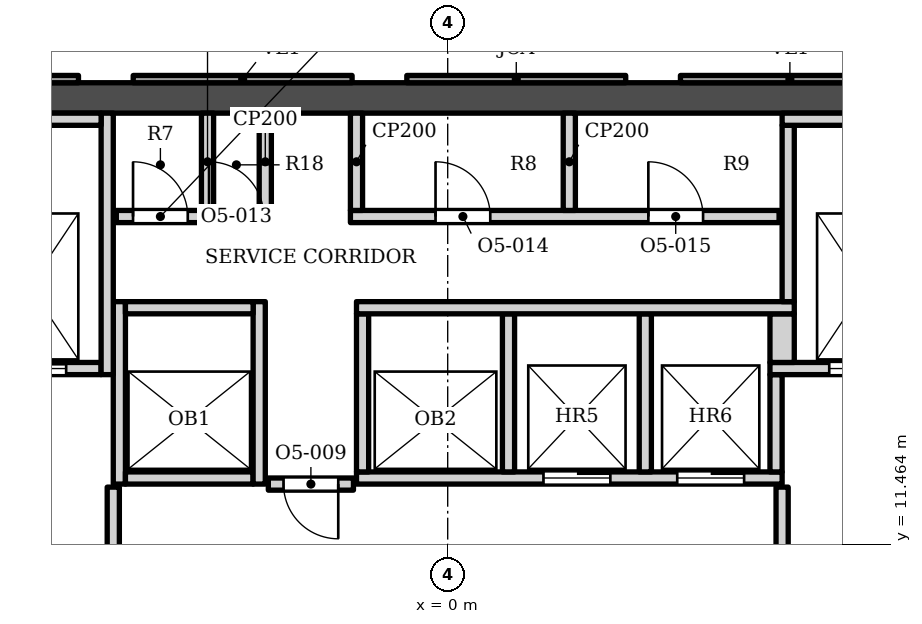
"""IFC4 building model, lengths in metres.
Left out: names, types, materials, properties, quantities, classifications, styles, units other than length and angle.
Written with IfcOpenShell. Run it as: python <this file> out.ifc"""

import sys

from ifc_helpers import new_model, si_unit, direction, frame, frame_2d, origin, place, context, subcontext, project, spatial, polyline, rectangle, outline, extrude, element, fill, save


model = new_model("IFC4")
c1 = context("Model", 3, precision=1e-05, world=origin(), true_north=direction((0.0, 1.0)))
c2 = subcontext(c1, "Body", "Model", "MODEL_VIEW")
j1 = project(units=[si_unit("LENGTHUNIT", "METRE"), si_unit("PLANEANGLEUNIT", "RADIAN")], contexts=[c1])
p1 = place(None, origin())
s1 = spatial("IfcSite", under=j1, at=p1, CompositionType="ELEMENT")
p2 = place(p1, origin())
s2 = spatial("IfcBuilding", under=s1, at=p2, CompositionType="ELEMENT")
p3 = place(p2, frame((0.0, 0.0, 196.4)))
s3 = spatial("IfcBuildingStorey", under=s2, at=p3, CompositionType="ELEMENT", Elevation=196.4)
p4 = place(p3, frame((-13.9, 18.802, 0.0), z_axis=(0.0, 0.0, 1.0), x_axis=(1.0, 0.0, 0.0)))
e1 = element("IfcWall", 1, at=p4, inside=s3, PredefinedType="SHEAR", context=c2, shape_type="SweptSolid", body=[
    extrude(rectangle(XDim=27.8, YDim=0.5, at=frame_2d((13.9, 0.0))), origin(), (0.0, 0.0, 1.0), 3.9),
])
p5 = place(p3, origin())
e2 = element("IfcWall", 2, at=p5, inside=s3, PredefinedType="ELEMENTEDWALL", context=c2, shape_type="SweptSolid", body=[
    extrude(outline(polyline([(3.828, 19.173), (3.828, 19.052), (7.428, 19.052), (7.428, 19.173), (3.828, 19.173)])), origin(), (0.0, 0.0, 1.0), 3.0),
])
p6 = place(p3, origin())
e3 = element("IfcWall", 3, at=p6, inside=s3, PredefinedType="SOLIDWALL", context=c2, shape_type="SweptSolid", body=[
    extrude(outline(polyline([(-0.672, 19.173), (-0.672, 19.052), (2.928, 19.052), (2.928, 19.173), (-0.672, 19.173)])), origin(), (0.0, 0.0, 1.0), 3.0),
])
p7 = place(p3, origin())
e4 = element("IfcWall", 4, at=p7, inside=s3, PredefinedType="ELEMENTEDWALL", context=c2, shape_type="SweptSolid", body=[
    extrude(outline(polyline([(-5.172, 19.173), (-5.172, 19.052), (-1.572, 19.052), (-1.572, 19.173), (-5.172, 19.173)])), origin(), (0.0, 0.0, 1.0), 3.0),
])
p8 = place(p3, origin())
e5 = element("IfcWall", 5, at=p8, inside=s3, PredefinedType="SOLIDWALL", context=c2, shape_type="SweptSolid", body=[
    extrude(outline(polyline([(-9.672, 19.173), (-9.672, 19.052), (-6.072, 19.052), (-6.072, 19.173), (-9.672, 19.173)])), origin(), (0.0, 0.0, 1.0), 3.0),
])
p9 = place(p3, frame((-5.5, 9.103, 0.0), z_axis=(0.0, 0.0, 1.0), x_axis=(0.0, 1.0, 0.0)))
e6 = element("IfcWall", 6, at=p9, inside=s3, PredefinedType="SOLIDWALL", context=c2, shape_type="SweptSolid", body=[
    extrude(rectangle(XDim=3.3, YDim=0.2, at=frame_2d((1.65, 0.0))), origin(), (0.0, 0.0, 1.0), 3.73),
])
p10 = place(p9, frame((0.85, 0.0, 0.0)))
e7 = element("IfcOpeningElement", 7, at=p10, cuts=e6, PredefinedType="OPENING", context=c2, shape_type="SweptSolid", body=[
    extrude(rectangle(XDim=1.4, YDim=2.1, at=frame_2d((0.7, 1.05))), frame((0.0, 0.11, 0.0), z_axis=(0.0, -1.0, 0.0), x_axis=(1.0, 0.0, 0.0)), (0.0, 0.0, 1.0), 0.22),
])
p11 = place(p3, frame((5.5, 9.103, 0.0), z_axis=(0.0, 0.0, 1.0), x_axis=(0.0, 1.0, 0.0)))
e8 = element("IfcWall", 8, at=p11, inside=s3, PredefinedType="SOLIDWALL", context=c2, shape_type="SweptSolid", body=[
    extrude(rectangle(XDim=3.3, YDim=0.2, at=frame_2d((1.65, 0.0))), origin(), (0.0, 0.0, 1.0), 3.73),
])
p12 = place(p11, frame((0.85, 0.0, 0.0)))
e9 = element("IfcOpeningElement", 9, at=p12, cuts=e8, PredefinedType="OPENING", context=c2, shape_type="SweptSolid", body=[
    extrude(rectangle(XDim=1.4, YDim=2.1, at=frame_2d((0.7, 1.05))), frame((0.0, 0.11, 0.0), z_axis=(0.0, -1.0, 0.0), x_axis=(1.0, 0.0, 0.0)), (0.0, 0.0, 1.0), 0.22),
])
p13 = place(p3, frame((-2.95, 12.453, 0.0), z_axis=(0.0, 0.0, 1.0), x_axis=(1.0, 0.0, 0.0)))
e10 = element("IfcWall", 10, at=p13, inside=s3, PredefinedType="SOLIDWALL", context=c2, shape_type="SweptSolid", body=[
    extrude(rectangle(XDim=1.4, YDim=0.2, at=frame_2d((0.7, 0.0))), origin(), (0.0, 0.0, 1.0), 3.73),
])
p14 = place(p13, frame((0.25, 0.0, 0.0)))
e11 = element("IfcOpeningElement", 11, at=p14, cuts=e10, PredefinedType="OPENING", context=c2, shape_type="SweptSolid", body=[
    extrude(rectangle(XDim=0.9, YDim=2.1, at=frame_2d((0.45, 1.05))), frame((0.0, 0.11, 0.0), z_axis=(0.0, -1.0, 0.0), x_axis=(1.0, 0.0, 0.0)), (0.0, 0.0, 1.0), 0.22),
])
p15 = place(p3, frame((-5.4, 12.453, 0.0), z_axis=(0.0, 0.0, 1.0), x_axis=(0.0, 1.0, 0.0)))
e12 = element("IfcWall", 12, at=p15, inside=s3, PredefinedType="SOLIDWALL", context=c2, shape_type="SweptSolid", body=[
    extrude(rectangle(XDim=3.0, YDim=0.2, at=frame_2d((1.5, 0.0))), origin(), (0.0, 0.0, 1.0), 3.73),
])
p16 = place(p3, frame((-5.3, 12.552, 0.0), z_axis=(0.0, 0.0, 1.0), x_axis=(1.0, 0.0, 0.0)))
e13 = element("IfcWall", 13, at=p16, inside=s3, PredefinedType="SOLIDWALL", context=c2, shape_type="SweptSolid", body=[
    extrude(rectangle(XDim=2.1, YDim=0.2, at=frame_2d((1.05, 0.0))), origin(), (0.0, 0.0, 1.0), 3.73),
])
p17 = place(p3, frame((-3.1, 12.453, 0.0), z_axis=(0.0, 0.0, 1.0), x_axis=(0.0, 1.0, 0.0)))
e14 = element("IfcWall", 14, at=p17, inside=s3, PredefinedType="SOLIDWALL", context=c2, shape_type="SweptSolid", body=[
    extrude(rectangle(XDim=3.0, YDim=0.2, at=frame_2d((1.5, 0.0))), origin(), (0.0, 0.0, 1.0), 3.73),
])
p18 = place(p3, frame((-1.5, 12.552, 0.0), z_axis=(0.0, 0.0, 1.0), x_axis=(1.0, 0.0, 0.0)))
e15 = element("IfcWall", 15, at=p18, inside=s3, PredefinedType="SOLIDWALL", context=c2, shape_type="SweptSolid", body=[
    extrude(rectangle(XDim=7.0, YDim=0.2, at=frame_2d((3.5, 0.0))), origin(), (0.0, 0.0, 1.0), 3.73),
])
p19 = place(p18, frame((3.075, 0.0, 0.0)))
e16 = element("IfcOpeningElement", 16, at=p19, cuts=e15, PredefinedType="OPENING", context=c2, shape_type="SweptSolid", body=[
    extrude(rectangle(XDim=1.1, YDim=2.1, at=frame_2d((0.55, 1.05))), frame((0.0, 0.11, 0.0), z_axis=(0.0, -1.0, 0.0), x_axis=(1.0, 0.0, 0.0)), (0.0, 0.0, 1.0), 0.22),
])
p20 = place(p18, frame((5.275, 0.0, 0.0)))
e17 = element("IfcOpeningElement", 17, at=p20, cuts=e15, PredefinedType="OPENING", context=c2, shape_type="SweptSolid", body=[
    extrude(rectangle(XDim=1.1, YDim=2.1, at=frame_2d((0.55, 1.05))), frame((0.0, 0.11, 0.0), z_axis=(0.0, -1.0, 0.0), x_axis=(1.0, 0.0, 0.0)), (0.0, 0.0, 1.0), 0.22),
])
for number, where, z_axis, x_axis in (
    (18, (-1.4, 12.653, 0.0), (0.0, 0.0, 1.0), (0.0, 1.0, 0.0)),
    (19, (1.0, 12.653, 0.0), (0.0, 0.0, 1.0), (0.0, 1.0, 0.0)),
    (20, (3.25, 12.653, 0.0), (0.0, 0.0, 1.0), (0.0, 1.0, 0.0)),
):
    element("IfcWall", number, at=place(p3, frame(where, z_axis=z_axis, x_axis=x_axis)), inside=s3, PredefinedType="SOLIDWALL", context=c2, shape_type="SweptSolid", body=[
        extrude(rectangle(XDim=2.6, YDim=0.2, at=frame_2d((1.3, 0.0))), origin(), (0.0, 0.0, 1.0), 3.73),
    ])
p21 = place(p3, frame((5.4, 12.653, 0.0), z_axis=(0.0, 0.0, 1.0), x_axis=(0.0, 1.0, 0.0)))
e21 = element("IfcWall", 21, at=p21, inside=s3, PredefinedType="SOLIDWALL", context=c2, shape_type="SweptSolid", body=[
    extrude(rectangle(XDim=1.6, YDim=0.2, at=frame_2d((0.8, 0.0))), origin(), (0.0, 0.0, 1.0), 3.73),
])
p22 = place(p3, frame((-8.05, 14.353, 0.0), z_axis=(0.0, 0.0, 1.0), x_axis=(1.0, 0.0, 0.0)))
e22 = element("IfcWall", 22, at=p22, inside=s3, PredefinedType="SOLIDWALL", context=c2, shape_type="SweptSolid", body=[
    extrude(rectangle(XDim=2.35, YDim=0.2, at=frame_2d((1.175, 0.0))), origin(), (0.0, 0.0, 1.0), 3.73),
])
p23 = place(p22, frame((0.575, 0.0, 0.0)))
e23 = element("IfcOpeningElement", 23, at=p23, cuts=e22, PredefinedType="OPENING", context=c2, shape_type="SweptSolid", body=[
    extrude(rectangle(XDim=1.2, YDim=2.1, at=frame_2d((0.6, 1.05))), frame((0.0, 0.11, 0.0), z_axis=(0.0, -1.0, 0.0), x_axis=(1.0, 0.0, 0.0)), (0.0, 0.0, 1.0), 0.22),
])
p24 = place(p3, frame((-5.6, 14.253, 0.0), z_axis=(0.0, 0.0, 1.0), x_axis=(0.0, 1.0, 0.0)))
e24 = element("IfcWall", 24, at=p24, inside=s3, PredefinedType="SOLIDWALL", context=c2, shape_type="SweptSolid", body=[
    extrude(rectangle(XDim=4.3, YDim=0.2, at=frame_2d((2.15, 0.0))), origin(), (0.0, 0.0, 1.0), 3.73),
])
p25 = place(p3, frame((5.3, 14.353, 0.0), z_axis=(0.0, 0.0, 1.0), x_axis=(1.0, 0.0, 0.0)))
e25 = element("IfcWall", 25, at=p25, inside=s3, PredefinedType="SOLIDWALL", context=c2, shape_type="SweptSolid", body=[
    extrude(rectangle(XDim=2.75, YDim=0.2, at=frame_2d((1.375, 0.0))), origin(), (0.0, 0.0, 1.0), 3.73),
])
p26 = place(p25, frame((0.975, 0.0, 0.0)))
e26 = element("IfcOpeningElement", 26, at=p26, cuts=e25, PredefinedType="OPENING", context=c2, shape_type="SweptSolid", body=[
    extrude(rectangle(XDim=1.2, YDim=2.1, at=frame_2d((0.6, 1.05))), frame((0.0, 0.11, 0.0), z_axis=(0.0, -1.0, 0.0), x_axis=(1.0, 0.0, 0.0)), (0.0, 0.0, 1.0), 0.22),
])
p27 = place(p3, frame((5.5, 14.453, 0.0), z_axis=(0.0, 0.0, 1.0), x_axis=(0.0, 1.0, 0.0)))
e27 = element("IfcWall", 27, at=p27, inside=s3, PredefinedType="SOLIDWALL", context=c2, shape_type="SweptSolid", body=[
    extrude(rectangle(XDim=0.8, YDim=0.4, at=frame_2d((0.4, 0.0))), origin(), (0.0, 0.0, 1.0), 3.73),
])
p28 = place(p3, frame((-5.3, 15.353, 0.0), z_axis=(0.0, 0.0, 1.0), x_axis=(1.0, 0.0, 0.0)))
e28 = element("IfcWall", 28, at=p28, inside=s3, PredefinedType="SOLIDWALL", context=c2, shape_type="SweptSolid", body=[
    extrude(rectangle(XDim=2.1, YDim=0.2, at=frame_2d((1.05, 0.0))), origin(), (0.0, 0.0, 1.0), 3.73),
])
p29 = place(p3, frame((-1.5, 15.353, 0.0), z_axis=(0.0, 0.0, 1.0), x_axis=(1.0, 0.0, 0.0)))
e29 = element("IfcWall", 29, at=p29, inside=s3, PredefinedType="SOLIDWALL", context=c2, shape_type="SweptSolid", body=[
    extrude(rectangle(XDim=7.2, YDim=0.2, at=frame_2d((3.6, 0.0))), origin(), (0.0, 0.0, 1.0), 3.73),
])
p30 = place(p3, frame((5.6, 15.453, 0.0), z_axis=(0.0, 0.0, 1.0), x_axis=(0.0, 1.0, 0.0)))
e30 = element("IfcWall", 30, at=p30, inside=s3, PredefinedType="SOLIDWALL", context=c2, shape_type="SweptSolid", body=[
    extrude(rectangle(XDim=2.9, YDim=0.2, at=frame_2d((1.45, 0.0))), origin(), (0.0, 0.0, 1.0), 3.73),
])
p31 = place(p3, frame((-5.45, 16.853, 0.0), z_axis=(0.0, 0.0, 1.0), x_axis=(1.0, 0.0, 0.0)))
e31 = element("IfcWall", 31, at=p31, inside=s3, PredefinedType="SOLIDWALL", context=c2, shape_type="SweptSolid", body=[
    extrude(rectangle(XDim=2.55, YDim=0.2, at=frame_2d((1.275, 0.0))), origin(), (0.0, 0.0, 1.0), 3.73),
])
p32 = place(p31, frame((0.275, 0.0, 0.0)))
e32 = element("IfcOpeningElement", 32, at=p32, cuts=e31, PredefinedType="OPENING", context=c2, shape_type="SweptSolid", body=[
    extrude(rectangle(XDim=0.9, YDim=2.1, at=frame_2d((0.45, 1.05))), frame((0.0, 0.11, 0.0), z_axis=(0.0, -1.0, 0.0), x_axis=(1.0, 0.0, 0.0)), (0.0, 0.0, 1.0), 0.22),
])
p33 = place(p31, frame((1.525, 0.0, 0.0)))
e33 = element("IfcOpeningElement", 33, at=p33, cuts=e31, PredefinedType="OPENING", context=c2, shape_type="SweptSolid", body=[
    extrude(rectangle(XDim=0.9, YDim=2.1, at=frame_2d((0.45, 1.05))), frame((0.0, 0.11, 0.0), z_axis=(0.0, -1.0, 0.0), x_axis=(1.0, 0.0, 0.0)), (0.0, 0.0, 1.0), 0.22),
])
p34 = place(p3, frame((-1.6, 16.853, 0.0), z_axis=(0.0, 0.0, 1.0), x_axis=(1.0, 0.0, 0.0)))
e34 = element("IfcWall", 34, at=p34, inside=s3, PredefinedType="SOLIDWALL", context=c2, shape_type="SweptSolid", body=[
    extrude(rectangle(XDim=7.05, YDim=0.2, at=frame_2d((3.525, 0.0))), origin(), (0.0, 0.0, 1.0), 3.73),
])
p35 = place(p34, frame((1.4, 0.0, 0.0)))
e35 = element("IfcOpeningElement", 35, at=p35, cuts=e34, PredefinedType="OPENING", context=c2, shape_type="SweptSolid", body=[
    extrude(rectangle(XDim=0.9, YDim=2.1, at=frame_2d((0.45, 1.05))), frame((0.0, 0.11, 0.0), z_axis=(0.0, -1.0, 0.0), x_axis=(1.0, 0.0, 0.0)), (0.0, 0.0, 1.0), 0.22),
])
p36 = place(p34, frame((4.9, 0.0, 0.0)))
e36 = element("IfcOpeningElement", 36, at=p36, cuts=e34, PredefinedType="OPENING", context=c2, shape_type="SweptSolid", body=[
    extrude(rectangle(XDim=0.9, YDim=2.1, at=frame_2d((0.45, 1.05))), frame((0.0, 0.11, 0.0), z_axis=(0.0, -1.0, 0.0), x_axis=(1.0, 0.0, 0.0)), (0.0, 0.0, 1.0), 0.22),
])
for number, where, z_axis, x_axis in (
    (37, (-3.95, 16.953, 0.0), (0.0, 0.0, 1.0), (0.0, 1.0, 0.0)),
    (38, (-3.0, 16.953, 0.0), (0.0, 0.0, 1.0), (0.0, 1.0, 0.0)),
    (39, (-1.5, 16.953, 0.0), (0.0, 0.0, 1.0), (0.0, 1.0, 0.0)),
    (40, (2.0, 16.953, 0.0), (0.0, 0.0, 1.0), (0.0, 1.0, 0.0)),
):
    element("IfcWall", number, at=place(p3, frame(where, z_axis=z_axis, x_axis=x_axis)), inside=s3, PredefinedType="PARTITIONING", context=c2, shape_type="SweptSolid", body=[
        extrude(rectangle(XDim=1.6, YDim=0.2, at=frame_2d((0.8, 0.0))), origin(), (0.0, 0.0, 1.0), 3.73),
    ])
p37 = place(p3, frame((-8.05, 18.453, 0.0), z_axis=(0.0, 0.0, 1.0), x_axis=(1.0, 0.0, 0.0)))
e41 = element("IfcWall", 41, at=p37, inside=s3, PredefinedType="SOLIDWALL", context=c2, shape_type="SweptSolid", body=[
    extrude(rectangle(XDim=2.35, YDim=0.2, at=frame_2d((1.175, 0.0))), origin(), (0.0, 0.0, 1.0), 3.73),
])
p38 = place(p3, frame((5.5, 18.453, 0.0), z_axis=(0.0, 0.0, 1.0), x_axis=(1.0, 0.0, 0.0)))
e42 = element("IfcWall", 42, at=p38, inside=s3, PredefinedType="SOLIDWALL", context=c2, shape_type="SweptSolid", body=[
    extrude(rectangle(XDim=2.55, YDim=0.2, at=frame_2d((1.275, 0.0))), origin(), (0.0, 0.0, 1.0), 3.73),
])
p39 = place(p19, origin())
e43 = element("IfcDoor", 43, at=p39, inside=s3, OperationType="DOUBLE_DOOR_SLIDING", PredefinedType="DOOR", context=c2, shape_type="SweptSolid", body=[
    extrude(rectangle(XDim=1.1, YDim=2.1, at=frame_2d((0.55, 1.05))), frame((0.0, 0.025, 0.0), z_axis=(0.0, -1.0, 0.0), x_axis=(1.0, 0.0, 0.0)), (0.0, 0.0, 1.0), 0.05),
])
fill(e16, e43)
p40 = place(p20, origin())
e44 = element("IfcDoor", 44, at=p40, inside=s3, OperationType="DOUBLE_DOOR_SLIDING", PredefinedType="DOOR", context=c2, shape_type="SweptSolid", body=[
    extrude(rectangle(XDim=1.1, YDim=2.1, at=frame_2d((0.55, 1.05))), frame((0.0, 0.025, 0.0), z_axis=(0.0, -1.0, 0.0), x_axis=(1.0, 0.0, 0.0)), (0.0, 0.0, 1.0), 0.05),
])
fill(e17, e44)
p41 = place(p23, origin())
e45 = element("IfcDoor", 45, at=p41, inside=s3, OperationType="DOUBLE_DOOR_SLIDING", PredefinedType="DOOR", context=c2, shape_type="SweptSolid", body=[
    extrude(rectangle(XDim=1.2, YDim=2.1, at=frame_2d((0.6, 1.05))), frame((0.0, 0.025, 0.0), z_axis=(0.0, -1.0, 0.0), x_axis=(1.0, 0.0, 0.0)), (0.0, 0.0, 1.0), 0.05),
])
fill(e23, e45)
p42 = place(p26, origin())
e46 = element("IfcDoor", 46, at=p42, inside=s3, OperationType="DOUBLE_DOOR_SLIDING", PredefinedType="DOOR", context=c2, shape_type="SweptSolid", body=[
    extrude(rectangle(XDim=1.2, YDim=2.1, at=frame_2d((0.6, 1.05))), frame((0.0, 0.025, 0.0), z_axis=(0.0, -1.0, 0.0), x_axis=(1.0, 0.0, 0.0)), (0.0, 0.0, 1.0), 0.05),
])
fill(e26, e46)
p43 = place(p14, origin())
e47 = element("IfcDoor", 47, at=p43, inside=s3, OperationType="SINGLE_SWING_RIGHT", PredefinedType="DOOR", context=c2, shape_type="SweptSolid", body=[
    extrude(rectangle(XDim=0.9, YDim=2.1, at=frame_2d((0.45, 1.05))), frame((0.0, 0.025, 0.0), z_axis=(0.0, -1.0, 0.0), x_axis=(1.0, 0.0, 0.0)), (0.0, 0.0, 1.0), 0.05),
])
fill(e11, e47)
p44 = place(p32, origin())
e48 = element("IfcDoor", 48, at=p44, inside=s3, OperationType="SINGLE_SWING_LEFT", PredefinedType="DOOR", context=c2, shape_type="SweptSolid", body=[
    extrude(rectangle(XDim=0.9, YDim=2.1, at=frame_2d((0.45, 1.05))), frame((0.0, 0.025, 0.0), z_axis=(0.0, -1.0, 0.0), x_axis=(1.0, 0.0, 0.0)), (0.0, 0.0, 1.0), 0.05),
])
fill(e32, e48)
p45 = place(p33, origin())
e49 = element("IfcDoor", 49, at=p45, inside=s3, OperationType="SINGLE_SWING_LEFT", PredefinedType="DOOR", context=c2, shape_type="SweptSolid", body=[
    extrude(rectangle(XDim=0.9, YDim=2.1, at=frame_2d((0.45, 1.05))), frame((0.0, 0.025, 0.0), z_axis=(0.0, -1.0, 0.0), x_axis=(1.0, 0.0, 0.0)), (0.0, 0.0, 1.0), 0.05),
])
fill(e33, e49)
p46 = place(p35, origin())
e50 = element("IfcDoor", 50, at=p46, inside=s3, OperationType="SINGLE_SWING_LEFT", PredefinedType="DOOR", context=c2, shape_type="SweptSolid", body=[
    extrude(rectangle(XDim=0.9, YDim=2.1, at=frame_2d((0.45, 1.05))), frame((0.0, 0.025, 0.0), z_axis=(0.0, -1.0, 0.0), x_axis=(1.0, 0.0, 0.0)), (0.0, 0.0, 1.0), 0.05),
])
fill(e35, e50)
p47 = place(p36, origin())
e51 = element("IfcDoor", 51, at=p47, inside=s3, OperationType="SINGLE_SWING_LEFT", PredefinedType="DOOR", context=c2, shape_type="SweptSolid", body=[
    extrude(rectangle(XDim=0.9, YDim=2.1, at=frame_2d((0.45, 1.05))), frame((0.0, 0.025, 0.0), z_axis=(0.0, -1.0, 0.0), x_axis=(1.0, 0.0, 0.0)), (0.0, 0.0, 1.0), 0.05),
])
fill(e36, e51)
save(model, sys.argv[1])
